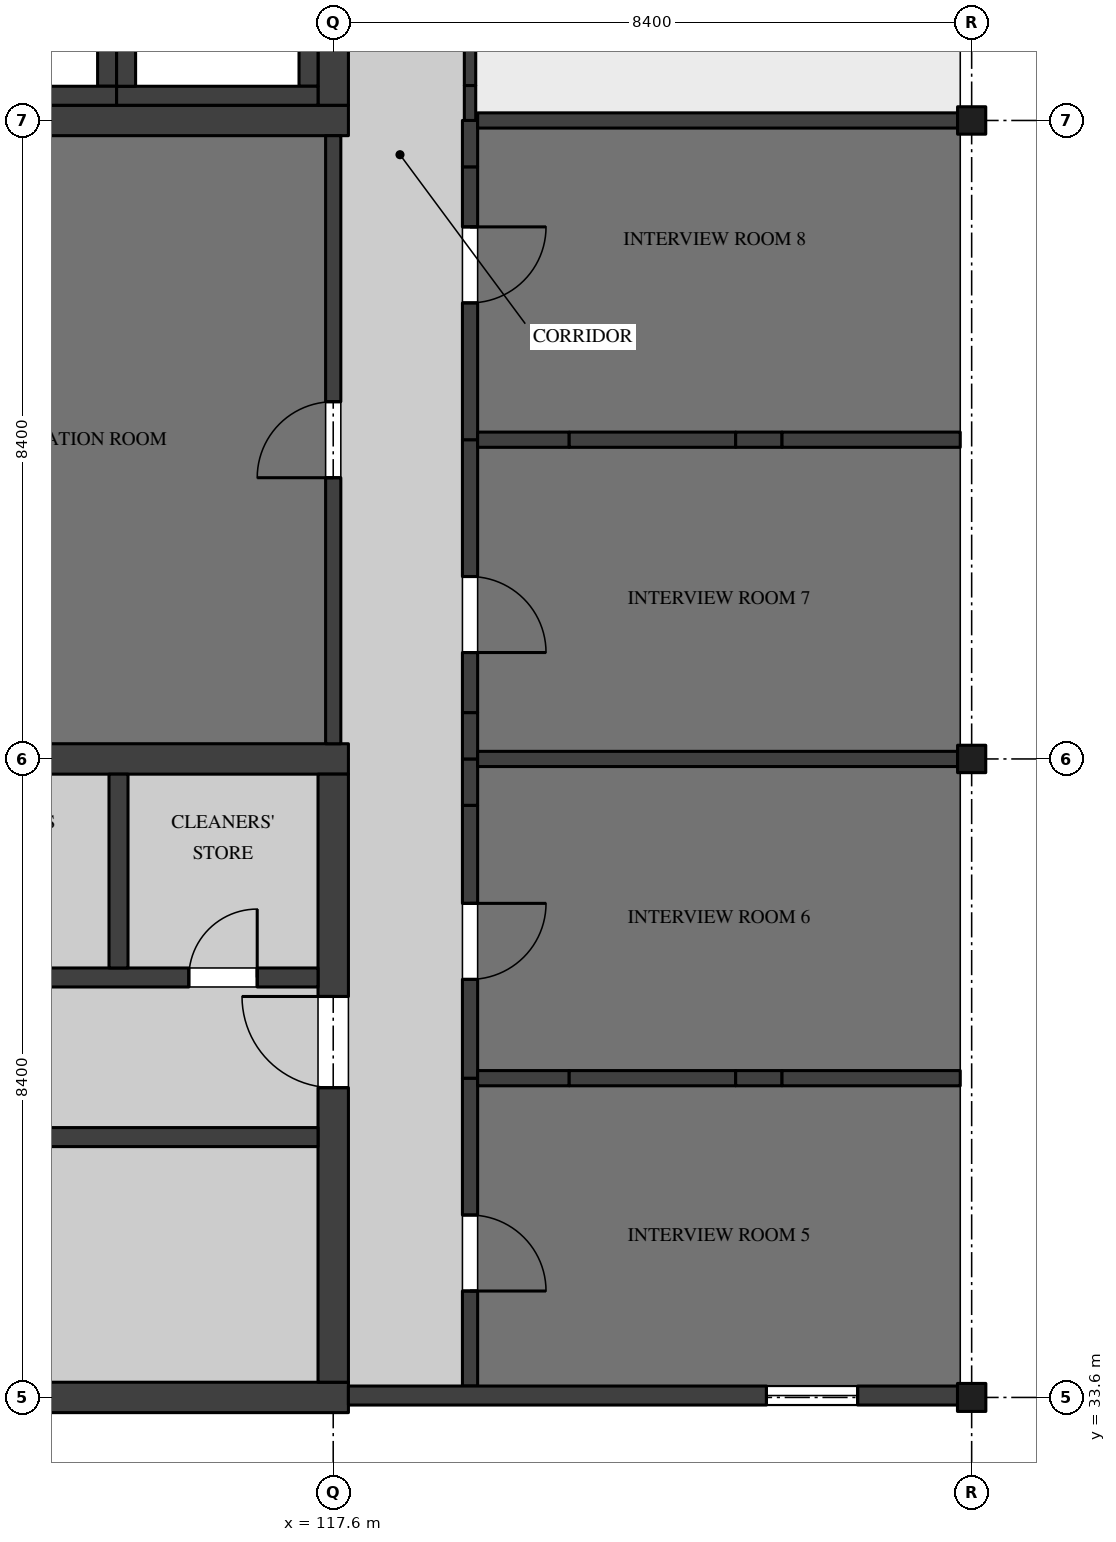
"""IFC4 building model, lengths in metres.
Left out: names, types, materials, properties, quantities, classifications, styles, units other than length and angle.
Written with IfcOpenShell. Run it as: python <this file> out.ifc"""

import sys

from ifc_helpers import new_model, si_unit, direction, frame, frame_2d, origin, origin_2d, place, context, subcontext, project, spatial, rectangle, i_section, extrude, element, fill, save


model = new_model("IFC4")
c1 = context("Model", 3, precision=1e-05, world=origin(), true_north=direction((0.0, 1.0)))
c2 = subcontext(c1, "Body", "Model", "MODEL_VIEW")
j1 = project(units=[si_unit("LENGTHUNIT", "METRE"), si_unit("PLANEANGLEUNIT", "RADIAN")], contexts=[c1])
p1 = place(None, origin())
s1 = spatial("IfcSite", under=j1, at=p1, CompositionType="ELEMENT")
p2 = place(p1, origin())
s2 = spatial("IfcBuilding", under=s1, at=p2, CompositionType="ELEMENT")
p3 = place(p2, frame((0.0, 0.0, 32.4)))
s3 = spatial("IfcBuildingStorey", under=s2, at=p3, CompositionType="ELEMENT", Elevation=32.4)
p4 = place(p3, frame((126.0, 33.6, 0.0), z_axis=(0.0, 0.0, 1.0), x_axis=(1.0, 0.0, 0.0)))
e1 = element("IfcColumn", 1, at=p4, inside=s3, PredefinedType="COLUMN", context=c2, shape_type="SweptSolid", body=[
    extrude(i_section(OverallWidth=0.373, OverallDepth=0.368, WebThickness=0.015, FlangeThickness=0.024, FilletRadius=0.015, at=origin_2d()), origin(), (0.0, 0.0, 1.0), 4.37),
])
for number, where, z_axis, x_axis in (
    (2, (126.0, 42.0, 0.0), (0.0, 0.0, 1.0), (1.0, 0.0, 0.0)),
    (3, (126.0, 50.4, 0.0), (0.0, 0.0, 1.0), (1.0, 0.0, 0.0)),
):
    element("IfcColumn", number, at=place(p3, frame(where, z_axis=z_axis, x_axis=x_axis)), inside=s3, PredefinedType="COLUMN", context=c2, shape_type="SweptSolid", body=[
        extrude(i_section(OverallWidth=0.371, OverallDepth=0.361, WebThickness=0.012, FlangeThickness=0.02, FilletRadius=0.015, at=origin_2d()), origin(), (0.0, 0.0, 1.0), 4.37),
    ])
p5 = place(p3, frame((109.0, 50.4, 0.0), z_axis=(0.0, 0.0, 1.0), x_axis=(1.0, 0.0, 0.0)))
e4 = element("IfcWall", 4, at=p5, inside=s3, PredefinedType="SHEAR", context=c2, shape_type="SweptSolid", body=[
    extrude(rectangle(XDim=8.8, YDim=0.4, at=frame_2d((4.4, 0.0))), origin(), (0.0, 0.0, 1.0), 4.37),
])
p6 = place(p3, frame((117.6, 50.6, 0.0), z_axis=(0.0, 0.0, 1.0), x_axis=(0.0, 1.0, 0.0)))
e5 = element("IfcWall", 5, at=p6, inside=s3, PredefinedType="SHEAR", context=c2, shape_type="SweptSolid", body=[
    extrude(rectangle(XDim=8.0, YDim=0.4, at=frame_2d((4.0, 0.0))), origin(), (0.0, 0.0, 1.0), 4.37),
])
p7 = place(p6, frame((3.25, 0.0, 0.0)))
e6 = element("IfcOpeningElement", 6, at=p7, cuts=e5, PredefinedType="OPENING", context=c2, shape_type="SweptSolid", body=[
    extrude(rectangle(XDim=1.2, YDim=2.1, at=frame_2d((0.6, 1.05))), frame((0.0, 0.21, 0.0), z_axis=(0.0, -1.0, 0.0), x_axis=(1.0, 0.0, 0.0)), (0.0, 0.0, 1.0), 0.42),
])
p8 = place(p6, frame((6.0, 0.0, 0.0)))
e7 = element("IfcOpeningElement", 7, at=p8, cuts=e5, PredefinedType="OPENING", context=c2, shape_type="SweptSolid", body=[
    extrude(rectangle(XDim=1.2, YDim=2.1, at=frame_2d((0.6, 1.05))), frame((0.0, 0.21, 0.0), z_axis=(0.0, -1.0, 0.0), x_axis=(1.0, 0.0, 0.0)), (0.0, 0.0, 1.0), 0.42),
])
for number, where, z_axis, x_axis in (
    (8, (109.0, 33.6, 0.0), (0.0, 0.0, 1.0), (1.0, 0.0, 0.0)),
    (9, (109.0, 42.0, 0.0), (0.0, 0.0, 1.0), (1.0, 0.0, 0.0)),
):
    element("IfcWall", number, at=place(p3, frame(where, z_axis=z_axis, x_axis=x_axis)), inside=s3, PredefinedType="SHEAR", context=c2, shape_type="SweptSolid", body=[
        extrude(rectangle(XDim=8.8, YDim=0.4, at=frame_2d((4.4, 0.0))), origin(), (0.0, 0.0, 1.0), 4.37),
    ])
p9 = place(p3, frame((117.6, 33.8, 0.0), z_axis=(0.0, 0.0, 1.0), x_axis=(0.0, 1.0, 0.0)))
e10 = element("IfcWall", 10, at=p9, inside=s3, PredefinedType="SHEAR", context=c2, shape_type="SweptSolid", body=[
    extrude(rectangle(XDim=8.0, YDim=0.4, at=frame_2d((4.0, 0.0))), origin(), (0.0, 0.0, 1.0), 4.37),
])
p10 = place(p9, frame((3.875, 0.0, 0.0)))
e11 = element("IfcOpeningElement", 11, at=p10, cuts=e10, PredefinedType="OPENING", context=c2, shape_type="SweptSolid", body=[
    extrude(rectangle(XDim=1.2, YDim=2.1, at=frame_2d((0.6, 1.05))), frame((0.0, 0.21, 0.0), z_axis=(0.0, -1.0, 0.0), x_axis=(1.0, 0.0, 0.0)), (0.0, 0.0, 1.0), 0.42),
])
p11 = place(p3, frame((109.4, 37.025, 0.0), z_axis=(0.0, 0.0, 1.0), x_axis=(1.0, 0.0, 0.0)))
e12 = element("IfcWall", 12, at=p11, inside=s3, PredefinedType="SOLIDWALL", context=c2, shape_type="SweptSolid", body=[
    extrude(rectangle(XDim=8.0, YDim=0.25, at=frame_2d((4.0, 0.0))), origin(), (0.0, 0.0, 1.0), 4.37),
])
p12 = place(p11, frame((0.2, 0.0, 0.0)))
e13 = element("IfcOpeningElement", 13, at=p12, cuts=e12, PredefinedType="OPENING", context=c2, shape_type="SweptSolid", body=[
    extrude(rectangle(XDim=1.1, YDim=2.1, at=frame_2d((0.55, 1.05))), frame((0.0, 0.135, 0.0), z_axis=(0.0, -1.0, 0.0), x_axis=(1.0, 0.0, 0.0)), (0.0, 0.0, 1.0), 0.27),
])
p13 = place(p3, frame((112.05, 39.125, 0.0), z_axis=(0.0, 0.0, 1.0), x_axis=(1.0, 0.0, 0.0)))
e14 = element("IfcWall", 14, at=p13, inside=s3, PredefinedType="SOLIDWALL", context=c2, shape_type="SweptSolid", body=[
    extrude(rectangle(XDim=5.35, YDim=0.25, at=frame_2d((2.675, 0.0))), origin(), (0.0, 0.0, 1.0), 4.37),
])
p14 = place(p13, frame((3.65, 0.0, 0.0)))
e15 = element("IfcOpeningElement", 15, at=p14, cuts=e14, PredefinedType="OPENING", context=c2, shape_type="SweptSolid", body=[
    extrude(rectangle(XDim=0.9, YDim=2.1, at=frame_2d((0.45, 1.05))), frame((0.0, 0.135, 0.0), z_axis=(0.0, -1.0, 0.0), x_axis=(1.0, 0.0, 0.0)), (0.0, 0.0, 1.0), 0.27),
])
p15 = place(p13, frame((0.9, 0.0, 0.0)))
e16 = element("IfcOpeningElement", 16, at=p15, cuts=e14, PredefinedType="OPENING", context=c2, shape_type="SweptSolid", body=[
    extrude(rectangle(XDim=0.8, YDim=2.1, at=frame_2d((0.4, 1.05))), frame((0.0, 0.135, 0.0), z_axis=(0.0, -1.0, 0.0), x_axis=(1.0, 0.0, 0.0)), (0.0, 0.0, 1.0), 0.27),
])
p16 = place(p3, frame((114.775, 39.25, 0.0), z_axis=(0.0, 0.0, 1.0), x_axis=(0.0, 1.0, 0.0)))
e17 = element("IfcWall", 17, at=p16, inside=s3, PredefinedType="SOLIDWALL", context=c2, shape_type="SweptSolid", body=[
    extrude(rectangle(XDim=2.55, YDim=0.25, at=frame_2d((1.275, 0.0))), origin(), (0.0, 0.0, 1.0), 4.37),
])
p17 = place(p3, frame((114.625, 50.85, 0.0), z_axis=(0.0, 0.0, 1.0), x_axis=(0.0, 1.0, 0.0)))
e18 = element("IfcWall", 18, at=p17, inside=s3, PredefinedType="SOLIDWALL", context=c2, shape_type="SweptSolid", body=[
    extrude(rectangle(XDim=2.3, YDim=0.25, at=frame_2d((1.15, 0.0))), origin(), (0.0, 0.0, 1.0), 4.37),
])
p18 = place(p3, frame((112.05, 50.725, 0.0), z_axis=(0.0, 0.0, 1.0), x_axis=(1.0, 0.0, 0.0)))
e19 = element("IfcWall", 19, at=p18, inside=s3, PredefinedType="SOLIDWALL", context=c2, shape_type="SweptSolid", body=[
    extrude(rectangle(XDim=2.7, YDim=0.25, at=frame_2d((1.35, 0.0))), origin(), (0.0, 0.0, 1.0), 4.37),
])
p19 = place(p3, frame((117.275, 50.85, 0.0), z_axis=(0.0, 0.0, 1.0), x_axis=(0.0, 1.0, 0.0)))
e20 = element("IfcWall", 20, at=p19, inside=s3, PredefinedType="SOLIDWALL", context=c2, shape_type="SweptSolid", body=[
    extrude(rectangle(XDim=2.3, YDim=0.25, at=frame_2d((1.15, 0.0))), origin(), (0.0, 0.0, 1.0), 4.37),
])
p20 = place(p3, frame((114.75, 50.725, 0.0), z_axis=(0.0, 0.0, 1.0), x_axis=(1.0, 0.0, 0.0)))
e21 = element("IfcWall", 21, at=p20, inside=s3, PredefinedType="SOLIDWALL", context=c2, shape_type="SweptSolid", body=[
    extrude(rectangle(XDim=2.65, YDim=0.25, at=frame_2d((1.325, 0.0))), origin(), (0.0, 0.0, 1.0), 4.37),
])
p21 = place(p3, frame((114.875, 50.85, 0.0), z_axis=(0.0, 0.0, 1.0), x_axis=(0.0, 1.0, 0.0)))
e22 = element("IfcWall", 22, at=p21, inside=s3, PredefinedType="SOLIDWALL", context=c2, shape_type="SweptSolid", body=[
    extrude(rectangle(XDim=2.3, YDim=0.25, at=frame_2d((1.15, 0.0))), origin(), (0.0, 0.0, 1.0), 4.37),
])
p22 = place(p3, frame((119.4, 33.75, 0.0), z_axis=(0.0, 0.0, 1.0), x_axis=(0.0, 1.0, 0.0)))
e23 = element("IfcWall", 23, at=p22, inside=s3, PredefinedType="PARTITIONING", context=c2, shape_type="SweptSolid", body=[
    extrude(rectangle(XDim=4.05, YDim=0.2, at=frame_2d((2.025, 0.0))), origin(), (0.0, 0.0, 1.0), 4.37),
])
p23 = place(p22, frame((1.25, 0.0, 0.0)))
e24 = element("IfcOpeningElement", 24, at=p23, cuts=e23, PredefinedType="OPENING", context=c2, shape_type="SweptSolid", body=[
    extrude(rectangle(XDim=1.0, YDim=2.1, at=frame_2d((0.5, 1.05))), frame((0.0, 0.11, 0.0), z_axis=(0.0, -1.0, 0.0), x_axis=(1.0, 0.0, 0.0)), (0.0, 0.0, 1.0), 0.22),
])
p24 = place(p3, frame((119.4, 37.8, 0.0), z_axis=(0.0, 0.0, 1.0), x_axis=(0.0, 1.0, 0.0)))
e25 = element("IfcWall", 25, at=p24, inside=s3, PredefinedType="PARTITIONING", context=c2, shape_type="SweptSolid", body=[
    extrude(rectangle(XDim=3.59, YDim=0.2, at=frame_2d((1.795, 0.0))), origin(), (0.0, 0.0, 1.0), 4.37),
])
p25 = place(p24, frame((1.3, 0.0, 0.0)))
e26 = element("IfcOpeningElement", 26, at=p25, cuts=e25, PredefinedType="OPENING", context=c2, shape_type="SweptSolid", body=[
    extrude(rectangle(XDim=1.0, YDim=2.1, at=frame_2d((0.5, 1.05))), frame((0.0, 0.11, 0.0), z_axis=(0.0, -1.0, 0.0), x_axis=(1.0, 0.0, 0.0)), (0.0, 0.0, 1.0), 0.22),
])
for number, where, z_axis, x_axis in (
    (27, (119.4, 41.39, 0.0), (0.0, 0.0, 1.0), (0.0, 1.0, 0.0)),
    (28, (119.4, 42.0, 0.0), (0.0, 0.0, 1.0), (0.0, 1.0, 0.0)),
):
    element("IfcWall", number, at=place(p3, frame(where, z_axis=z_axis, x_axis=x_axis)), inside=s3, PredefinedType="PARTITIONING", context=c2, shape_type="SweptSolid", body=[
        extrude(rectangle(XDim=0.61, YDim=0.2, at=frame_2d((0.305, 0.0))), origin(), (0.0, 0.0, 1.0), 3.746),
    ])
p26 = place(p3, frame((119.4, 42.61, 0.0), z_axis=(0.0, 0.0, 1.0), x_axis=(0.0, 1.0, 0.0)))
e29 = element("IfcWall", 29, at=p26, inside=s3, PredefinedType="PARTITIONING", context=c2, shape_type="SweptSolid", body=[
    extrude(rectangle(XDim=3.59, YDim=0.2, at=frame_2d((1.795, 0.0))), origin(), (0.0, 0.0, 1.0), 4.37),
])
p27 = place(p26, frame((0.79, 0.0, 0.0)))
e30 = element("IfcOpeningElement", 30, at=p27, cuts=e29, PredefinedType="OPENING", context=c2, shape_type="SweptSolid", body=[
    extrude(rectangle(XDim=1.0, YDim=2.1, at=frame_2d((0.5, 1.05))), frame((0.0, 0.11, 0.0), z_axis=(0.0, -1.0, 0.0), x_axis=(1.0, 0.0, 0.0)), (0.0, 0.0, 1.0), 0.22),
])
p28 = place(p3, frame((119.4, 46.2, 0.0), z_axis=(0.0, 0.0, 1.0), x_axis=(0.0, 1.0, 0.0)))
e31 = element("IfcWall", 31, at=p28, inside=s3, PredefinedType="PARTITIONING", context=c2, shape_type="SweptSolid", body=[
    extrude(rectangle(XDim=3.59, YDim=0.2, at=frame_2d((1.795, 0.0))), origin(), (0.0, 0.0, 1.0), 4.37),
])
p29 = place(p28, frame((1.8, 0.0, 0.0)))
e32 = element("IfcOpeningElement", 32, at=p29, cuts=e31, PredefinedType="OPENING", context=c2, shape_type="SweptSolid", body=[
    extrude(rectangle(XDim=1.0, YDim=2.1, at=frame_2d((0.5, 1.05))), frame((0.0, 0.11, 0.0), z_axis=(0.0, -1.0, 0.0), x_axis=(1.0, 0.0, 0.0)), (0.0, 0.0, 1.0), 0.22),
])
p30 = place(p3, frame((119.4, 49.79, 0.0), z_axis=(0.0, 0.0, 1.0), x_axis=(0.0, 1.0, 0.0)))
e33 = element("IfcWall", 33, at=p30, inside=s3, PredefinedType="PARTITIONING", context=c2, shape_type="SweptSolid", body=[
    extrude(rectangle(XDim=0.61, YDim=0.2, at=frame_2d((0.305, 0.0))), origin(), (0.0, 0.0, 1.0), 3.746),
])
p31 = place(p3, frame((119.4, 50.4, 0.0), z_axis=(0.0, 0.0, 1.0), x_axis=(0.0, 1.0, 0.0)))
e34 = element("IfcWall", 34, at=p31, inside=s3, PredefinedType="PARTITIONING", context=c2, shape_type="SweptSolid", body=[
    extrude(rectangle(XDim=0.46, YDim=0.15, at=frame_2d((0.23, 0.0))), origin(), (0.0, 0.0, 1.0), 3.746),
])
p32 = place(p3, frame((119.4, 50.86, 0.0), z_axis=(0.0, 0.0, 1.0), x_axis=(0.0, 1.0, 0.0)))
e35 = element("IfcWall", 35, at=p32, inside=s3, PredefinedType="PARTITIONING", context=c2, shape_type="SweptSolid", body=[
    extrude(rectangle(XDim=7.71, YDim=0.15, at=frame_2d((3.855, 0.0))), origin(), (0.0, 0.0, 1.0), 4.37),
])
p33 = place(p32, frame((5.54, 0.0, 0.0)))
e36 = element("IfcOpeningElement", 36, at=p33, cuts=e35, PredefinedType="OPENING", context=c2, shape_type="SweptSolid", body=[
    extrude(rectangle(XDim=0.9, YDim=2.1, at=frame_2d((0.45, 1.05))), frame((0.0, 0.085, 0.0), z_axis=(0.0, -1.0, 0.0), x_axis=(1.0, 0.0, 0.0)), (0.0, 0.0, 1.0), 0.17),
])
p34 = place(p3, frame((117.6, 42.2, 0.0), z_axis=(0.0, 0.0, 1.0), x_axis=(0.0, 1.0, 0.0)))
e37 = element("IfcWall", 37, at=p34, inside=s3, PredefinedType="PARTITIONING", context=c2, shape_type="SweptSolid", body=[
    extrude(rectangle(XDim=8.0, YDim=0.2, at=frame_2d((4.0, 0.0))), origin(), (0.0, 0.0, 1.0), 3.746),
])
p35 = place(p34, frame((3.5, 0.0, 0.0)))
e38 = element("IfcOpeningElement", 38, at=p35, cuts=e37, PredefinedType="OPENING", context=c2, shape_type="SweptSolid", body=[
    extrude(rectangle(XDim=1.0, YDim=2.1, at=frame_2d((0.5, 1.05))), frame((0.0, 0.11, 0.0), z_axis=(0.0, -1.0, 0.0), x_axis=(1.0, 0.0, 0.0)), (0.0, 0.0, 1.0), 0.22),
])
p36 = place(p3, frame((119.5, 37.8, 0.0), z_axis=(0.0, 0.0, 1.0), x_axis=(1.0, 0.0, 0.0)))
e39 = element("IfcWall", 39, at=p36, inside=s3, PredefinedType="PARTITIONING", context=c2, shape_type="SweptSolid", body=[
    extrude(rectangle(XDim=1.205, YDim=0.2, at=frame_2d((0.603, 0.0))), origin(), (0.0, 0.0, 1.0), 3.895),
])
p37 = place(p3, frame((120.705, 37.8, 0.0), z_axis=(0.0, 0.0, 1.0), x_axis=(1.0, 0.0, 0.0)))
e40 = element("IfcWall", 40, at=p37, inside=s3, PredefinedType="PARTITIONING", context=c2, shape_type="SweptSolid", body=[
    extrude(rectangle(XDim=2.19, YDim=0.2, at=frame_2d((1.095, 0.0))), origin(), (0.0, 0.0, 1.0), 4.37),
])
p38 = place(p3, frame((122.895, 37.8, 0.0), z_axis=(0.0, 0.0, 1.0), x_axis=(1.0, 0.0, 0.0)))
e41 = element("IfcWall", 41, at=p38, inside=s3, PredefinedType="PARTITIONING", context=c2, shape_type="SweptSolid", body=[
    extrude(rectangle(XDim=0.61, YDim=0.2, at=frame_2d((0.305, 0.0))), origin(), (0.0, 0.0, 1.0), 3.895),
])
p39 = place(p3, frame((123.505, 37.8, 0.0), z_axis=(0.0, 0.0, 1.0), x_axis=(1.0, 0.0, 0.0)))
e42 = element("IfcWall", 42, at=p39, inside=s3, PredefinedType="PARTITIONING", context=c2, shape_type="SweptSolid", body=[
    extrude(rectangle(XDim=2.345, YDim=0.2, at=frame_2d((1.173, 0.0))), origin(), (0.0, 0.0, 1.0), 4.37),
])
p40 = place(p3, frame((119.5, 42.0, 0.0), z_axis=(0.0, 0.0, 1.0), x_axis=(1.0, 0.0, 0.0)))
e43 = element("IfcWall", 43, at=p40, inside=s3, PredefinedType="PARTITIONING", context=c2, shape_type="SweptSolid", body=[
    extrude(rectangle(XDim=6.314, YDim=0.2, at=frame_2d((3.157, 0.0))), origin(), (0.0, 0.0, 1.0), 3.746),
])
p41 = place(p3, frame((119.5, 46.2, 0.0), z_axis=(0.0, 0.0, 1.0), x_axis=(1.0, 0.0, 0.0)))
e44 = element("IfcWall", 44, at=p41, inside=s3, PredefinedType="PARTITIONING", context=c2, shape_type="SweptSolid", body=[
    extrude(rectangle(XDim=1.205, YDim=0.2, at=frame_2d((0.603, 0.0))), origin(), (0.0, 0.0, 1.0), 3.895),
])
p42 = place(p3, frame((120.705, 46.2, 0.0), z_axis=(0.0, 0.0, 1.0), x_axis=(1.0, 0.0, 0.0)))
e45 = element("IfcWall", 45, at=p42, inside=s3, PredefinedType="PARTITIONING", context=c2, shape_type="SweptSolid", body=[
    extrude(rectangle(XDim=2.19, YDim=0.2, at=frame_2d((1.095, 0.0))), origin(), (0.0, 0.0, 1.0), 4.37),
])
p43 = place(p3, frame((122.895, 46.2, 0.0), z_axis=(0.0, 0.0, 1.0), x_axis=(1.0, 0.0, 0.0)))
e46 = element("IfcWall", 46, at=p43, inside=s3, PredefinedType="PARTITIONING", context=c2, shape_type="SweptSolid", body=[
    extrude(rectangle(XDim=0.61, YDim=0.2, at=frame_2d((0.305, 0.0))), origin(), (0.0, 0.0, 1.0), 3.895),
])
p44 = place(p3, frame((123.505, 46.2, 0.0), z_axis=(0.0, 0.0, 1.0), x_axis=(1.0, 0.0, 0.0)))
e47 = element("IfcWall", 47, at=p44, inside=s3, PredefinedType="PARTITIONING", context=c2, shape_type="SweptSolid", body=[
    extrude(rectangle(XDim=2.345, YDim=0.2, at=frame_2d((1.173, 0.0))), origin(), (0.0, 0.0, 1.0), 4.37),
])
p45 = place(p3, frame((119.5, 50.4, 0.0), z_axis=(0.0, 0.0, 1.0), x_axis=(1.0, 0.0, 0.0)))
e48 = element("IfcWall", 48, at=p45, inside=s3, PredefinedType="PARTITIONING", context=c2, shape_type="SweptSolid", body=[
    extrude(rectangle(XDim=6.314, YDim=0.2, at=frame_2d((3.157, 0.0))), origin(), (0.0, 0.0, 1.0), 3.746),
])
p46 = place(p3, frame((117.8, 33.625, 0.0), z_axis=(0.0, 0.0, 1.0), x_axis=(1.0, 0.0, 0.0)))
e49 = element("IfcWall", 49, at=p46, inside=s3, PredefinedType="SOLIDWALL", context=c2, shape_type="SweptSolid", body=[
    extrude(rectangle(XDim=8.197, YDim=0.25, at=frame_2d((4.099, 0.0))), origin(), (0.0, 0.0, 1.0), 3.746),
])
p47 = place(p46, frame((5.5, 0.0, 2.1)))
e50 = element("IfcOpeningElement", 50, at=p47, cuts=e49, PredefinedType="OPENING", context=c2, shape_type="SweptSolid", body=[
    extrude(rectangle(XDim=1.2, YDim=0.45, at=frame_2d((0.6, 0.225))), frame((0.0, 0.135, 0.0), z_axis=(0.0, -1.0, 0.0), x_axis=(1.0, 0.0, 0.0)), (0.0, 0.0, 1.0), 0.27),
])
p48 = place(p14, origin())
e51 = element("IfcDoor", 51, at=p48, inside=s3, OperationType="SINGLE_SWING_LEFT", PredefinedType="DOOR", context=c2, shape_type="SweptSolid", body=[
    extrude(rectangle(XDim=0.9, YDim=2.1, at=frame_2d((0.45, 1.05))), frame((0.0, 0.035, 0.0), z_axis=(0.0, -1.0, 0.0), x_axis=(1.0, 0.0, 0.0)), (0.0, 0.0, 1.0), 0.07),
])
fill(e15, e51)
p49 = place(p10, origin())
e52 = element("IfcDoor", 52, at=p49, inside=s3, OperationType="SINGLE_SWING_LEFT", PredefinedType="DOOR", context=c2, shape_type="SweptSolid", body=[
    extrude(rectangle(XDim=1.2, YDim=2.1, at=frame_2d((0.6, 1.05))), frame((0.0, 0.035, 0.0), z_axis=(0.0, -1.0, 0.0), x_axis=(1.0, 0.0, 0.0)), (0.0, 0.0, 1.0), 0.07),
])
fill(e11, e52)
p50 = place(p23, frame((1.0, 0.0, 0.0), z_axis=(0.0, 0.0, 1.0), x_axis=(-1.0, 0.0, 0.0)))
e53 = element("IfcDoor", 53, at=p50, inside=s3, OperationType="SINGLE_SWING_LEFT", PredefinedType="DOOR", context=c2, shape_type="SweptSolid", body=[
    extrude(rectangle(XDim=1.0, YDim=2.1, at=frame_2d((0.5, 1.05))), frame((0.0, 0.045, 0.0), z_axis=(0.0, -1.0, 0.0), x_axis=(1.0, 0.0, 0.0)), (0.0, 0.0, 1.0), 0.09),
])
fill(e24, e53)
p51 = place(p25, frame((1.0, 0.0, 0.0), z_axis=(0.0, 0.0, 1.0), x_axis=(-1.0, 0.0, 0.0)))
e54 = element("IfcDoor", 54, at=p51, inside=s3, OperationType="SINGLE_SWING_RIGHT", PredefinedType="DOOR", context=c2, shape_type="SweptSolid", body=[
    extrude(rectangle(XDim=1.0, YDim=2.1, at=frame_2d((0.5, 1.05))), frame((0.0, 0.045, 0.0), z_axis=(0.0, -1.0, 0.0), x_axis=(1.0, 0.0, 0.0)), (0.0, 0.0, 1.0), 0.09),
])
fill(e26, e54)
p52 = place(p27, frame((1.0, 0.0, 0.0), z_axis=(0.0, 0.0, 1.0), x_axis=(-1.0, 0.0, 0.0)))
e55 = element("IfcDoor", 55, at=p52, inside=s3, OperationType="SINGLE_SWING_LEFT", PredefinedType="DOOR", context=c2, shape_type="SweptSolid", body=[
    extrude(rectangle(XDim=1.0, YDim=2.1, at=frame_2d((0.5, 1.05))), frame((0.0, 0.045, 0.0), z_axis=(0.0, -1.0, 0.0), x_axis=(1.0, 0.0, 0.0)), (0.0, 0.0, 1.0), 0.09),
])
fill(e30, e55)
p53 = place(p29, frame((1.0, 0.0, 0.0), z_axis=(0.0, 0.0, 1.0), x_axis=(-1.0, 0.0, 0.0)))
e56 = element("IfcDoor", 56, at=p53, inside=s3, OperationType="SINGLE_SWING_RIGHT", PredefinedType="DOOR", context=c2, shape_type="SweptSolid", body=[
    extrude(rectangle(XDim=1.0, YDim=2.1, at=frame_2d((0.5, 1.05))), frame((0.0, 0.045, 0.0), z_axis=(0.0, -1.0, 0.0), x_axis=(1.0, 0.0, 0.0)), (0.0, 0.0, 1.0), 0.09),
])
fill(e32, e56)
p54 = place(p35, origin())
e57 = element("IfcDoor", 57, at=p54, inside=s3, OperationType="SINGLE_SWING_RIGHT", PredefinedType="DOOR", context=c2, shape_type="SweptSolid", body=[
    extrude(rectangle(XDim=1.0, YDim=2.1, at=frame_2d((0.5, 1.05))), frame((0.0, 0.045, 0.0), z_axis=(0.0, -1.0, 0.0), x_axis=(1.0, 0.0, 0.0)), (0.0, 0.0, 1.0), 0.09),
])
fill(e38, e57)
p55 = place(p47, origin())
e58 = element("IfcWindow", 58, at=p55, inside=s3, PartitioningType="SINGLE_PANEL", PredefinedType="WINDOW", context=c2, shape_type="SweptSolid", body=[
    extrude(rectangle(XDim=1.2, YDim=0.45, at=frame_2d((0.6, 0.225))), frame((0.0, 0.05, 0.0), z_axis=(0.0, -1.0, 0.0), x_axis=(1.0, 0.0, 0.0)), (0.0, 0.0, 1.0), 0.1),
])
fill(e50, e58)
save(model, sys.argv[1])
